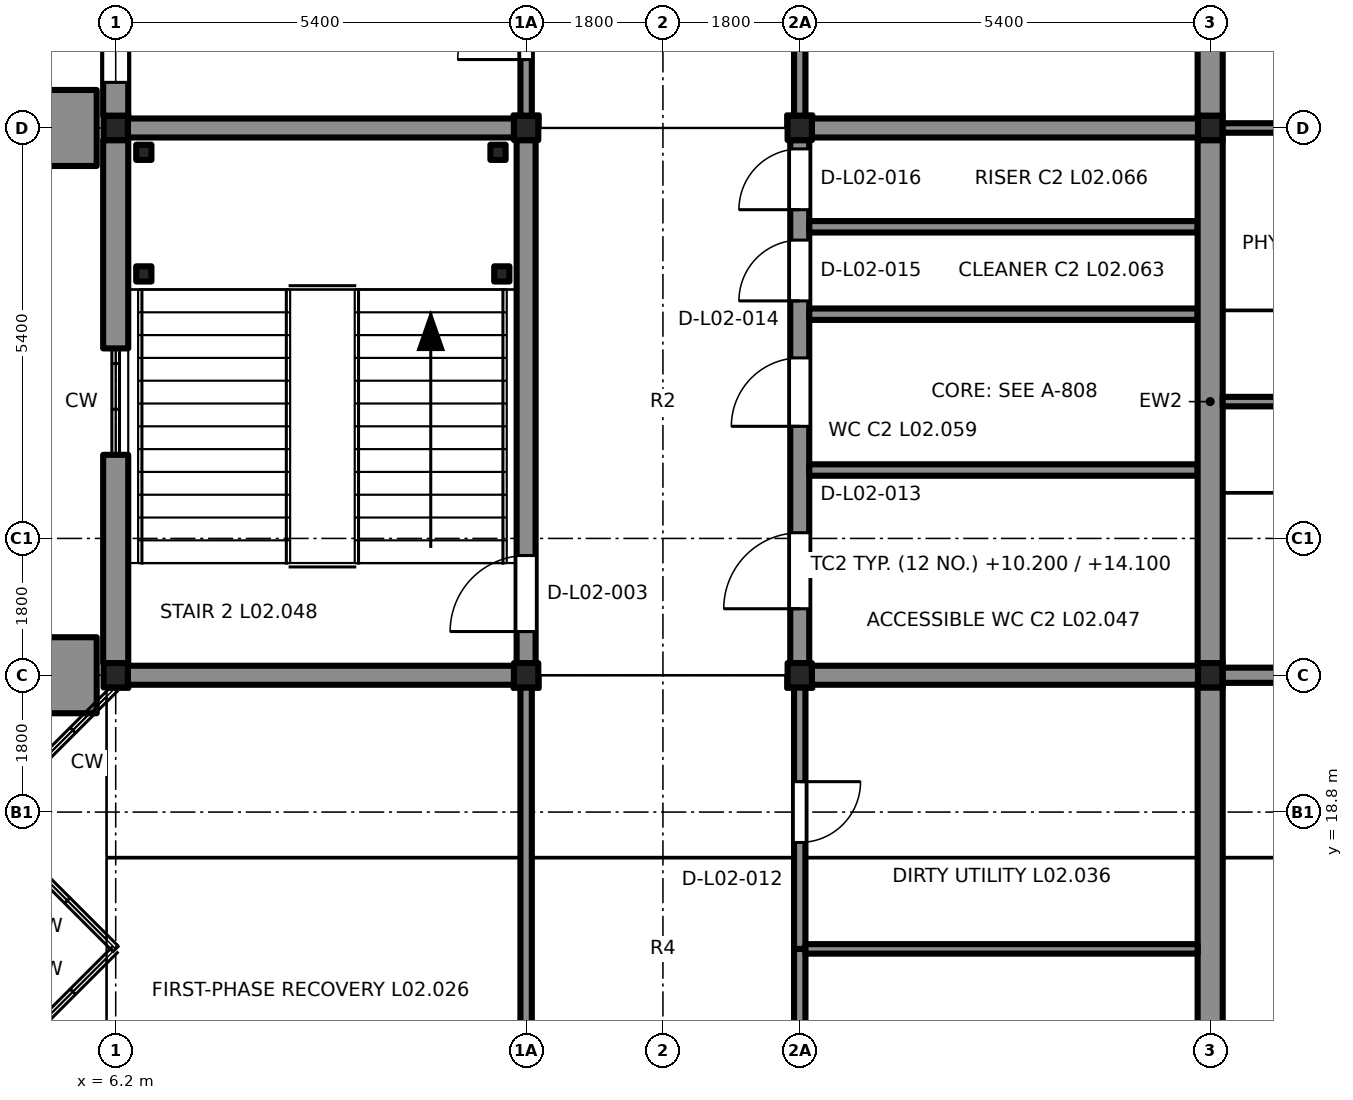
"""IFC4 building model, lengths in metres.
Left out: names, types, materials, properties, quantities, classifications, styles, units other than length and angle.
Written with IfcOpenShell. Run it as: python <this file> out.ifc"""

import sys

from ifc_helpers import new_model, si_unit, direction, frame, frame_2d, origin, origin_2d, place, context, subcontext, project, spatial, rectangle, extrude, element, fill, save


model = new_model("IFC4")
c1 = context("Model", 3, precision=1e-05, world=origin(), true_north=direction((0.0, 1.0)))
c2 = subcontext(c1, "Body", "Model", "MODEL_VIEW")
j1 = project(units=[si_unit("LENGTHUNIT", "METRE"), si_unit("PLANEANGLEUNIT", "RADIAN")], contexts=[c1])
p1 = place(None, origin())
s1 = spatial("IfcSite", under=j1, at=p1, CompositionType="ELEMENT")
p2 = place(p1, origin())
s2 = spatial("IfcBuilding", under=s1, at=p2, CompositionType="ELEMENT")
p3 = place(p2, frame((0.0, 0.0, 10.2)))
s3 = spatial("IfcBuildingStorey", under=s2, at=p3, CompositionType="ELEMENT", Elevation=10.2)
for number, where, z_axis, x_axis in (
    (1, (6.2, 20.6, 0.0), (0.0, 0.0, 1.0), (1.0, 0.0, 0.0)),
    (2, (11.6, 20.6, 0.0), (0.0, 0.0, 1.0), (1.0, 0.0, 0.0)),
    (3, (15.2, 20.6, 0.0), (0.0, 0.0, 1.0), (1.0, 0.0, 0.0)),
    (4, (20.6, 20.6, 0.0), (0.0, 0.0, 1.0), (1.0, 0.0, 0.0)),
    (5, (6.2, 27.8, 0.0), (0.0, 0.0, 1.0), (1.0, 0.0, 0.0)),
    (6, (11.6, 27.8, 0.0), (0.0, 0.0, 1.0), (1.0, 0.0, 0.0)),
    (7, (15.2, 27.8, 0.0), (0.0, 0.0, 1.0), (1.0, 0.0, 0.0)),
    (8, (20.6, 27.8, 0.0), (0.0, 0.0, 1.0), (1.0, 0.0, 0.0)),
):
    element("IfcColumn", number, at=place(p3, frame(where, z_axis=z_axis, x_axis=x_axis)), inside=s3, PredefinedType="COLUMN", context=c2, shape_type="SweptSolid", body=[
        extrude(rectangle(XDim=0.32, YDim=0.32, at=origin_2d()), origin(), (0.0, 0.0, 1.0), 3.9),
    ])
p4 = place(p3, frame((11.6, 20.76, 0.0), z_axis=(0.0, 0.0, 1.0), x_axis=(0.0, 1.0, 0.0)))
e9 = element("IfcWall", 9, at=p4, inside=s3, PredefinedType="SHEAR", context=c2, shape_type="SweptSolid", body=[
    extrude(rectangle(XDim=6.88, YDim=0.25, at=frame_2d((3.44, 0.0))), origin(), (0.0, 0.0, 1.0), 3.65),
])
p5 = place(p4, frame((0.415, 0.0, 0.0)))
e10 = element("IfcOpeningElement", 10, at=p5, cuts=e9, PredefinedType="OPENING", context=c2, shape_type="SweptSolid", body=[
    extrude(rectangle(XDim=1.0, YDim=2.1, at=frame_2d((0.5, 1.05))), frame((0.0, 0.135, 0.0), z_axis=(0.0, -1.0, 0.0), x_axis=(1.0, 0.0, 0.0)), (0.0, 0.0, 1.0), 0.27),
])
for number, where, z_axis, x_axis in (
    (11, (6.36, 20.6, 0.0), (0.0, 0.0, 1.0), (1.0, 0.0, 0.0)),
    (12, (6.36, 27.8, 0.0), (0.0, 0.0, 1.0), (1.0, 0.0, 0.0)),
):
    element("IfcWall", number, at=place(p3, frame(where, z_axis=z_axis, x_axis=x_axis)), inside=s3, PredefinedType="SHEAR", context=c2, shape_type="SweptSolid", body=[
        extrude(rectangle(XDim=5.08, YDim=0.25, at=frame_2d((2.54, 0.0))), origin(), (0.0, 0.0, 1.0), 3.65),
    ])
p6 = place(p3, frame((15.2, 20.76, 0.0), z_axis=(0.0, 0.0, 1.0), x_axis=(0.0, 1.0, 0.0)))
e13 = element("IfcWall", 13, at=p6, inside=s3, PredefinedType="SHEAR", context=c2, shape_type="SweptSolid", body=[
    extrude(rectangle(XDim=6.88, YDim=0.25, at=frame_2d((3.44, 0.0))), origin(), (0.0, 0.0, 1.0), 3.65),
])
p7 = place(p6, frame((0.715, 0.0, 0.0)))
e14 = element("IfcOpeningElement", 14, at=p7, cuts=e13, PredefinedType="OPENING", context=c2, shape_type="SweptSolid", body=[
    extrude(rectangle(XDim=1.0, YDim=2.1, at=frame_2d((0.5, 1.05))), frame((0.0, 0.135, 0.0), z_axis=(0.0, -1.0, 0.0), x_axis=(1.0, 0.0, 0.0)), (0.0, 0.0, 1.0), 0.27),
])
p8 = place(p6, frame((3.115, 0.0, 0.0)))
e15 = element("IfcOpeningElement", 15, at=p8, cuts=e13, PredefinedType="OPENING", context=c2, shape_type="SweptSolid", body=[
    extrude(rectangle(XDim=0.9, YDim=2.1, at=frame_2d((0.45, 1.05))), frame((0.0, 0.135, 0.0), z_axis=(0.0, -1.0, 0.0), x_axis=(1.0, 0.0, 0.0)), (0.0, 0.0, 1.0), 0.27),
])
p9 = place(p6, frame((4.765, 0.0, 0.0)))
e16 = element("IfcOpeningElement", 16, at=p9, cuts=e13, PredefinedType="OPENING", context=c2, shape_type="SweptSolid", body=[
    extrude(rectangle(XDim=0.8, YDim=2.1, at=frame_2d((0.4, 1.05))), frame((0.0, 0.135, 0.0), z_axis=(0.0, -1.0, 0.0), x_axis=(1.0, 0.0, 0.0)), (0.0, 0.0, 1.0), 0.27),
])
p10 = place(p6, frame((5.965, 0.0, 0.0)))
e17 = element("IfcOpeningElement", 17, at=p10, cuts=e13, PredefinedType="OPENING", context=c2, shape_type="SweptSolid", body=[
    extrude(rectangle(XDim=0.8, YDim=2.1, at=frame_2d((0.4, 1.05))), frame((0.0, 0.135, 0.0), z_axis=(0.0, -1.0, 0.0), x_axis=(1.0, 0.0, 0.0)), (0.0, 0.0, 1.0), 0.27),
])
for number, where, z_axis, x_axis in (
    (18, (15.36, 20.6, 0.0), (0.0, 0.0, 1.0), (1.0, 0.0, 0.0)),
    (19, (15.36, 27.8, 0.0), (0.0, 0.0, 1.0), (1.0, 0.0, 0.0)),
):
    element("IfcWall", number, at=place(p3, frame(where, z_axis=z_axis, x_axis=x_axis)), inside=s3, PredefinedType="SHEAR", context=c2, shape_type="SweptSolid", body=[
        extrude(rectangle(XDim=5.08, YDim=0.25, at=frame_2d((2.54, 0.0))), origin(), (0.0, 0.0, 1.0), 3.65),
    ])
for number, where, z_axis, x_axis in (
    (20, (15.325, 23.3, 0.0), (0.0, 0.0, 1.0), (1.0, 0.0, 0.0)),
    (21, (15.325, 25.35, 0.0), (0.0, 0.0, 1.0), (1.0, 0.0, 0.0)),
    (22, (15.325, 26.5, 0.0), (0.0, 0.0, 1.0), (1.0, 0.0, 0.0)),
):
    element("IfcWall", number, at=place(p3, frame(where, z_axis=z_axis, x_axis=x_axis)), inside=s3, PredefinedType="PARTITIONING", context=c2, shape_type="SweptSolid", body=[
        extrude(rectangle(XDim=5.11, YDim=0.15, at=frame_2d((2.555, 0.0))), origin(), (0.0, 0.0, 1.0), 3.65),
    ])
for number, where, z_axis, x_axis in (
    (23, (6.57, 27.48, 0.0), (0.0, 0.0, 1.0), (1.0, 0.0, 0.0)),
    (24, (11.23, 27.48, 0.0), (0.0, 0.0, 1.0), (1.0, 0.0, 0.0)),
    (25, (6.57, 25.88, 0.0), (0.0, 0.0, 1.0), (1.0, 0.0, 0.0)),
    (26, (11.28, 25.88, 0.0), (0.0, 0.0, 1.0), (1.0, 0.0, 0.0)),
):
    element("IfcColumn", number, at=place(p3, frame(where, z_axis=z_axis, x_axis=x_axis)), inside=s3, PredefinedType="COLUMN", context=c2, shape_type="SweptSolid", body=[
        extrude(rectangle(XDim=0.2, YDim=0.2, at=origin_2d()), origin(), (0.0, 0.0, 1.0), 1.75),
    ])
for number, where, z_axis, x_axis in (
    (27, (6.2, 20.76, 0.0), (0.0, 0.0, 1.0), (0.0, 1.0, 0.0)),
    (28, (6.2, 24.9, 0.0), (0.0, 0.0, 1.0), (0.0, 1.0, 0.0)),
):
    element("IfcWall", number, at=place(p3, frame(where, z_axis=z_axis, x_axis=x_axis)), inside=s3, PredefinedType="SOLIDWALL", context=c2, shape_type="SweptSolid", body=[
        extrude(rectangle(XDim=2.74, YDim=0.33, at=frame_2d((1.37, 0.0))), origin(), (0.0, 0.0, 1.0), 3.22),
    ])
p11 = place(p3, frame((6.2, 27.96, 0.0), z_axis=(0.0, 0.0, 1.0), x_axis=(0.0, 1.0, 0.0)))
e29 = element("IfcWall", 29, at=p11, inside=s3, PredefinedType="SOLIDWALL", context=c2, shape_type="SweptSolid", body=[
    extrude(rectangle(XDim=3.44, YDim=0.33, at=frame_2d((1.72, 0.0))), origin(), (0.0, 0.0, 1.0), 3.22),
])
p12 = place(p11, frame((0.44, 0.0, 0.45)))
e30 = element("IfcOpeningElement", 30, at=p12, cuts=e29, PredefinedType="OPENING", context=c2, shape_type="SweptSolid", body=[
    extrude(rectangle(XDim=2.4, YDim=2.1, at=frame_2d((1.2, 1.05))), frame((0.0, 0.175, 0.0), z_axis=(0.0, -1.0, 0.0), x_axis=(1.0, 0.0, 0.0)), (0.0, 0.0, 1.0), 0.35),
])
for number, where, z_axis, x_axis in (
    (31, (5.575, 20.1, 0.0), (0.0, 0.0, 1.0), (0.0, 1.0, 0.0)),
    (32, (5.575, 27.3, 0.0), (0.0, 0.0, 1.0), (0.0, 1.0, 0.0)),
):
    element("IfcWall", number, at=place(p3, frame(where, z_axis=z_axis, x_axis=x_axis)), inside=s3, PredefinedType="SOLIDWALL", context=c2, shape_type="SweptSolid", body=[
        extrude(rectangle(XDim=1.0, YDim=0.75, at=frame_2d((0.5, 0.0))), origin(), (0.0, 0.0, 1.0), 3.9),
    ])
for number, where, z_axis, x_axis in (
    (33, (20.6, 20.44, 0.0), (0.0, 0.0, 1.0), (0.0, -1.0, 0.0)),
    (34, (20.6, 27.64, 0.0), (0.0, 0.0, 1.0), (0.0, -1.0, 0.0)),
):
    element("IfcWall", number, at=place(p3, frame(where, z_axis=z_axis, x_axis=x_axis)), inside=s3, PredefinedType="SOLIDWALL", context=c2, shape_type="SweptSolid", body=[
        extrude(rectangle(XDim=6.88, YDim=0.33, at=frame_2d((3.44, 0.0))), origin(), (0.0, 0.0, 1.0), 3.22),
    ])
p13 = place(p3, frame((20.6, 34.84, 0.0), z_axis=(0.0, 0.0, 1.0), x_axis=(0.0, -1.0, 0.0)))
e35 = element("IfcWall", 35, at=p13, inside=s3, PredefinedType="SOLIDWALL", context=c2, shape_type="SweptSolid", body=[
    extrude(rectangle(XDim=6.88, YDim=0.33, at=frame_2d((3.44, 0.0))), origin(), (0.0, 0.0, 1.0), 3.22),
])
p14 = place(p3, frame((11.6, 13.56, 0.0), z_axis=(0.0, 0.0, 1.0), x_axis=(0.0, 1.0, 0.0)))
e36 = element("IfcWall", 36, at=p14, inside=s3, PredefinedType="PARTITIONING", context=c2, shape_type="SweptSolid", body=[
    extrude(rectangle(XDim=6.88, YDim=0.15, at=frame_2d((3.44, 0.0))), origin(), (0.0, 0.0, 1.0), 3.22),
])
p15 = place(p14, frame((1.14, 0.0, 0.0)))
e37 = element("IfcOpeningElement", 37, at=p15, cuts=e36, PredefinedType="OPENING", context=c2, shape_type="SweptSolid", body=[
    extrude(rectangle(XDim=1.0, YDim=2.1, at=frame_2d((0.5, 1.05))), frame((0.0, 0.085, 0.0), z_axis=(0.0, -1.0, 0.0), x_axis=(1.0, 0.0, 0.0)), (0.0, 0.0, 1.0), 0.17),
])
p16 = place(p3, frame((11.6, 27.96, 0.0), z_axis=(0.0, 0.0, 1.0), x_axis=(0.0, 1.0, 0.0)))
e38 = element("IfcWall", 38, at=p16, inside=s3, PredefinedType="PARTITIONING", context=c2, shape_type="SweptSolid", body=[
    extrude(rectangle(XDim=3.44, YDim=0.15, at=frame_2d((1.72, 0.0))), origin(), (0.0, 0.0, 1.0), 3.22),
])
p17 = place(p16, frame((0.74, 0.0, 0.0)))
e39 = element("IfcOpeningElement", 39, at=p17, cuts=e38, PredefinedType="OPENING", context=c2, shape_type="SweptSolid", body=[
    extrude(rectangle(XDim=1.8, YDim=2.1, at=frame_2d((0.9, 1.05))), frame((0.0, 0.085, 0.0), z_axis=(0.0, -1.0, 0.0), x_axis=(1.0, 0.0, 0.0)), (0.0, 0.0, 1.0), 0.17),
])
p18 = place(p3, frame((15.2, 17.0, 0.0), z_axis=(0.0, 0.0, 1.0), x_axis=(0.0, -1.0, 0.0)))
e40 = element("IfcWall", 40, at=p18, inside=s3, PredefinedType="PARTITIONING", context=c2, shape_type="SweptSolid", body=[
    extrude(rectangle(XDim=3.44, YDim=0.15, at=frame_2d((1.72, 0.0))), origin(), (0.0, 0.0, 1.0), 3.22),
])
p19 = place(p18, frame((1.3, 0.0, 0.0)))
e41 = element("IfcOpeningElement", 41, at=p19, cuts=e40, PredefinedType="OPENING", context=c2, shape_type="SweptSolid", body=[
    extrude(rectangle(XDim=1.0, YDim=2.1, at=frame_2d((0.5, 1.05))), frame((0.0, 0.085, 0.0), z_axis=(0.0, -1.0, 0.0), x_axis=(1.0, 0.0, 0.0)), (0.0, 0.0, 1.0), 0.17),
])
p20 = place(p3, frame((15.2, 20.44, 0.0), z_axis=(0.0, 0.0, 1.0), x_axis=(0.0, -1.0, 0.0)))
e42 = element("IfcWall", 42, at=p20, inside=s3, PredefinedType="PARTITIONING", context=c2, shape_type="SweptSolid", body=[
    extrude(rectangle(XDim=3.44, YDim=0.15, at=frame_2d((1.72, 0.0))), origin(), (0.0, 0.0, 1.0), 3.22),
])
p21 = place(p20, frame((1.24, 0.0, 0.0)))
e43 = element("IfcOpeningElement", 43, at=p21, cuts=e42, PredefinedType="OPENING", context=c2, shape_type="SweptSolid", body=[
    extrude(rectangle(XDim=0.8, YDim=2.1, at=frame_2d((0.4, 1.05))), frame((0.0, 0.085, 0.0), z_axis=(0.0, -1.0, 0.0), x_axis=(1.0, 0.0, 0.0)), (0.0, 0.0, 1.0), 0.17),
])
p22 = place(p3, frame((20.435, 17.0, 0.0), z_axis=(0.0, 0.0, 1.0), x_axis=(-1.0, 0.0, 0.0)))
e44 = element("IfcWall", 44, at=p22, inside=s3, PredefinedType="PARTITIONING", context=c2, shape_type="SweptSolid", body=[
    extrude(rectangle(XDim=5.16, YDim=0.125, at=frame_2d((2.58, 0.0))), origin(), (0.0, 0.0, 1.0), 3.38),
])
p23 = place(p3, frame((15.2, 34.84, 0.0), z_axis=(0.0, 0.0, 1.0), x_axis=(0.0, -1.0, 0.0)))
e45 = element("IfcWall", 45, at=p23, inside=s3, PredefinedType="PARTITIONING", context=c2, shape_type="SweptSolid", body=[
    extrude(rectangle(XDim=6.88, YDim=0.15, at=frame_2d((3.44, 0.0))), origin(), (0.0, 0.0, 1.0), 3.22),
])
p24 = place(p23, frame((4.74, 0.0, 0.0)))
e46 = element("IfcOpeningElement", 46, at=p24, cuts=e45, PredefinedType="OPENING", context=c2, shape_type="SweptSolid", body=[
    extrude(rectangle(XDim=1.0, YDim=2.1, at=frame_2d((0.5, 1.05))), frame((0.0, 0.085, 0.0), z_axis=(0.0, -1.0, 0.0), x_axis=(1.0, 0.0, 0.0)), (0.0, 0.0, 1.0), 0.17),
])
p25 = place(p3, frame((20.765, 20.6, 0.0), z_axis=(0.0, 0.0, 1.0), x_axis=(1.0, 0.0, 0.0)))
e47 = element("IfcWall", 47, at=p25, inside=s3, PredefinedType="PARTITIONING", context=c2, shape_type="SweptSolid", body=[
    extrude(rectangle(XDim=5.095, YDim=0.2, at=frame_2d((2.548, 0.0))), origin(), (0.0, 0.0, 1.0), 3.38),
])
p26 = place(p3, frame((20.765, 24.2, 0.0), z_axis=(0.0, 0.0, 1.0), x_axis=(1.0, 0.0, 0.0)))
e48 = element("IfcWall", 48, at=p26, inside=s3, PredefinedType="PARTITIONING", context=c2, shape_type="SweptSolid", body=[
    extrude(rectangle(XDim=5.16, YDim=0.125, at=frame_2d((2.58, 0.0))), origin(), (0.0, 0.0, 1.0), 3.38),
])
p27 = place(p3, frame((20.765, 27.8, 0.0), z_axis=(0.0, 0.0, 1.0), x_axis=(1.0, 0.0, 0.0)))
e49 = element("IfcWall", 49, at=p27, inside=s3, PredefinedType="PARTITIONING", context=c2, shape_type="SweptSolid", body=[
    extrude(rectangle(XDim=5.095, YDim=0.125, at=frame_2d((2.548, 0.0))), origin(), (0.0, 0.0, 1.0), 3.38),
])
p28 = place(p5, origin())
e50 = element("IfcDoor", 50, at=p28, inside=s3, OperationType="SINGLE_SWING_RIGHT", PredefinedType="DOOR", context=c2, shape_type="SweptSolid", body=[
    extrude(rectangle(XDim=1.0, YDim=2.1, at=frame_2d((0.5, 1.05))), frame((0.0, 0.025, 0.0), z_axis=(0.0, -1.0, 0.0), x_axis=(1.0, 0.0, 0.0)), (0.0, 0.0, 1.0), 0.05),
])
fill(e10, e50)
p29 = place(p7, origin())
e51 = element("IfcDoor", 51, at=p29, inside=s3, OperationType="SINGLE_SWING_LEFT", PredefinedType="DOOR", context=c2, shape_type="SweptSolid", body=[
    extrude(rectangle(XDim=1.0, YDim=2.1, at=frame_2d((0.5, 1.05))), frame((0.0, 0.025, 0.0), z_axis=(0.0, -1.0, 0.0), x_axis=(1.0, 0.0, 0.0)), (0.0, 0.0, 1.0), 0.05),
])
fill(e14, e51)
p30 = place(p8, origin())
e52 = element("IfcDoor", 52, at=p30, inside=s3, OperationType="SINGLE_SWING_LEFT", PredefinedType="DOOR", context=c2, shape_type="SweptSolid", body=[
    extrude(rectangle(XDim=0.9, YDim=2.1, at=frame_2d((0.45, 1.05))), frame((0.0, 0.025, 0.0), z_axis=(0.0, -1.0, 0.0), x_axis=(1.0, 0.0, 0.0)), (0.0, 0.0, 1.0), 0.05),
])
fill(e15, e52)
p31 = place(p9, origin())
e53 = element("IfcDoor", 53, at=p31, inside=s3, OperationType="SINGLE_SWING_LEFT", PredefinedType="DOOR", context=c2, shape_type="SweptSolid", body=[
    extrude(rectangle(XDim=0.8, YDim=2.1, at=frame_2d((0.4, 1.05))), frame((0.0, 0.025, 0.0), z_axis=(0.0, -1.0, 0.0), x_axis=(1.0, 0.0, 0.0)), (0.0, 0.0, 1.0), 0.05),
])
fill(e16, e53)
p32 = place(p10, origin())
e54 = element("IfcDoor", 54, at=p32, inside=s3, OperationType="SINGLE_SWING_LEFT", PredefinedType="DOOR", context=c2, shape_type="SweptSolid", body=[
    extrude(rectangle(XDim=0.8, YDim=2.1, at=frame_2d((0.4, 1.05))), frame((0.0, 0.025, 0.0), z_axis=(0.0, -1.0, 0.0), x_axis=(1.0, 0.0, 0.0)), (0.0, 0.0, 1.0), 0.05),
])
fill(e17, e54)
p33 = place(p12, origin())
e55 = element("IfcWindow", 55, at=p33, inside=s3, PartitioningType="SINGLE_PANEL", PredefinedType="WINDOW", context=c2, shape_type="SweptSolid", body=[
    extrude(rectangle(XDim=2.4, YDim=2.1, at=frame_2d((1.2, 1.05))), frame((0.0, -0.03, 0.0), z_axis=(0.0, -1.0, 0.0), x_axis=(1.0, 0.0, 0.0)), (0.0, 0.0, 1.0), 0.06),
])
fill(e30, e55)
p34 = place(p17, origin())
e56 = element("IfcDoor", 56, at=p34, inside=s3, OperationType="DOUBLE_DOOR_SINGLE_SWING", PredefinedType="DOOR", context=c2, shape_type="SweptSolid", body=[
    extrude(rectangle(XDim=1.8, YDim=2.1, at=frame_2d((0.9, 1.05))), frame((0.0, 0.025, 0.0), z_axis=(0.0, -1.0, 0.0), x_axis=(1.0, 0.0, 0.0)), (0.0, 0.0, 1.0), 0.05),
])
fill(e39, e56)
p35 = place(p21, origin())
e57 = element("IfcDoor", 57, at=p35, inside=s3, OperationType="SINGLE_SWING_LEFT", PredefinedType="DOOR", context=c2, shape_type="SweptSolid", body=[
    extrude(rectangle(XDim=0.8, YDim=2.1, at=frame_2d((0.4, 1.05))), frame((0.0, 0.025, 0.0), z_axis=(0.0, -1.0, 0.0), x_axis=(1.0, 0.0, 0.0)), (0.0, 0.0, 1.0), 0.05),
])
fill(e43, e57)
save(model, sys.argv[1])
